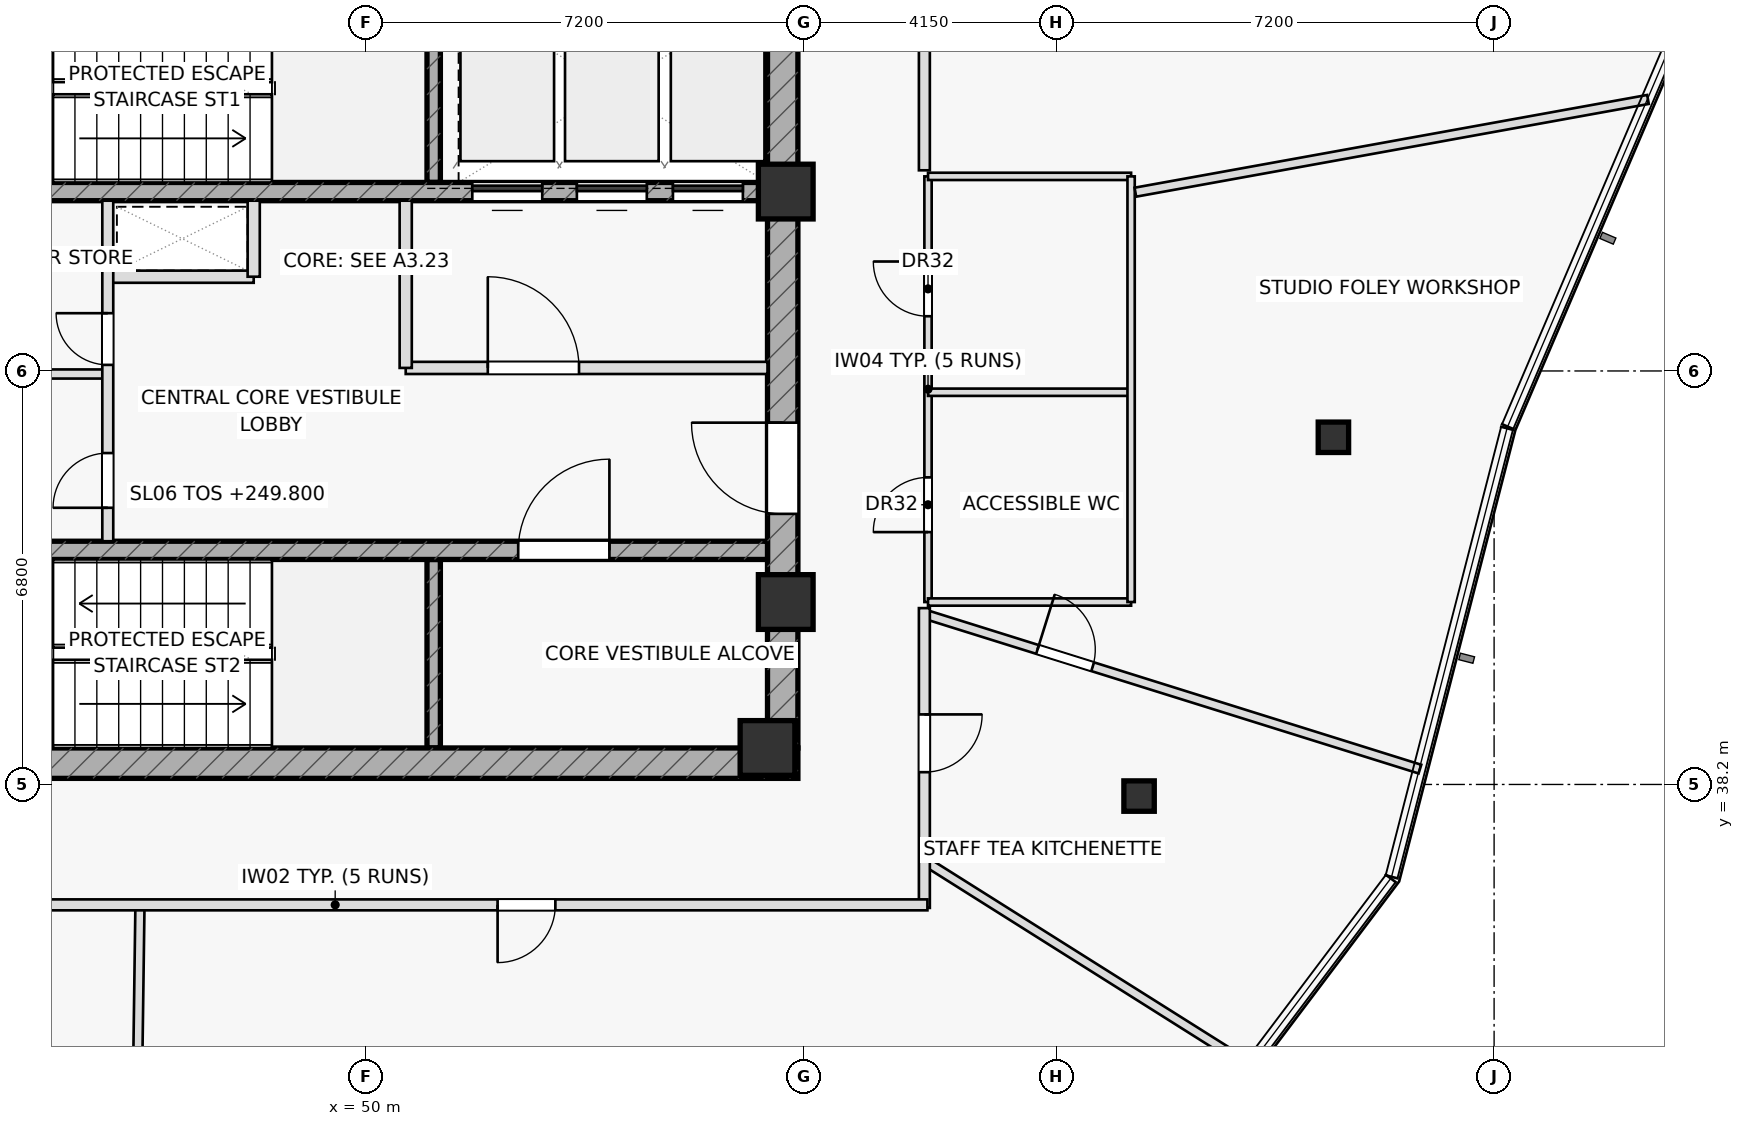
"""IFC4 building model, lengths in metres.
Left out: names, types, materials, properties, quantities, classifications, styles, units other than length and angle.
Written with IfcOpenShell. Run it as: python <this file> out.ifc"""

import sys

from ifc_helpers import new_model, si_unit, direction, frame, frame_2d, origin, origin_2d, place, context, subcontext, project, spatial, rectangle, hollow_rectangle, extrude, element, fill, save


model = new_model("IFC4")
c1 = context("Model", 3, precision=1e-05, world=origin(), true_north=direction((0.0, 1.0)))
c2 = subcontext(c1, "Body", "Model", "MODEL_VIEW")
j1 = project(units=[si_unit("LENGTHUNIT", "METRE"), si_unit("PLANEANGLEUNIT", "RADIAN")], contexts=[c1])
p1 = place(None, origin())
s1 = spatial("IfcSite", under=j1, at=p1, CompositionType="ELEMENT")
p2 = place(p1, origin())
s2 = spatial("IfcBuilding", under=s1, at=p2, CompositionType="ELEMENT")
p3 = place(p2, frame((0.0, 0.0, 249.8)))
s3 = spatial("IfcBuildingStorey", under=s2, at=p3, CompositionType="ELEMENT", Elevation=249.8)
for number, where, z_axis, x_axis in (
    (1, (51.11, 48.1, 0.0), (0.0, 0.0, 1.0), (0.0, 1.0, 0.0)),
    (2, (51.11, 38.8, 0.0), (0.0, 0.0, 1.0), (0.0, 1.0, 0.0)),
):
    element("IfcWall", number, at=place(p3, frame(where, z_axis=z_axis, x_axis=x_axis)), inside=s3, PredefinedType="SHEAR", context=c2, shape_type="SweptSolid", body=[
        extrude(rectangle(XDim=3.1, YDim=0.22, at=frame_2d((1.55, 0.0))), origin(), (0.0, 0.0, 1.0), 3.65),
    ])
p4 = place(p3, frame((42.9, 38.55, 0.0), z_axis=(0.0, 0.0, 1.0), x_axis=(1.0, 0.0, 0.0)))
e3 = element("IfcWall", 3, at=p4, inside=s3, PredefinedType="SHEAR", context=c2, shape_type="SweptSolid", body=[
    extrude(rectangle(XDim=14.2, YDim=0.5, at=frame_2d((7.1, 0.0))), origin(), (0.0, 0.0, 1.0), 3.65),
])
p5 = place(p4, frame((0.78, 0.0, 0.0)))
e4 = element("IfcOpeningElement", 4, at=p5, cuts=e3, PredefinedType="OPENING", context=c2, shape_type="SweptSolid", body=[
    extrude(rectangle(XDim=1.05, YDim=2.2, at=frame_2d((0.525, 1.1))), frame((0.0, 0.26, 0.0), z_axis=(0.0, -1.0, 0.0), x_axis=(1.0, 0.0, 0.0)), (0.0, 0.0, 1.0), 0.52),
])
p6 = place(p3, frame((56.85, 38.8, 0.0), z_axis=(0.0, 0.0, 1.0), x_axis=(0.0, 1.0, 0.0)))
e5 = element("IfcWall", 5, at=p6, inside=s3, PredefinedType="SHEAR", context=c2, shape_type="SweptSolid", body=[
    extrude(rectangle(XDim=12.4, YDim=0.5, at=frame_2d((6.2, 0.0))), origin(), (0.0, 0.0, 1.0), 3.65),
])
p7 = place(p6, frame((3.85, 0.0, 0.0)))
e6 = element("IfcOpeningElement", 6, at=p7, cuts=e5, PredefinedType="OPENING", context=c2, shape_type="SweptSolid", body=[
    extrude(rectangle(XDim=1.5, YDim=2.2, at=frame_2d((0.75, 1.1))), frame((0.0, 0.26, 0.0), z_axis=(0.0, -1.0, 0.0), x_axis=(1.0, 0.0, 0.0)), (0.0, 0.0, 1.0), 0.52),
])
p8 = place(p3, frame((43.4, 47.95, 0.0), z_axis=(0.0, 0.0, 1.0), x_axis=(1.0, 0.0, 0.0)))
e7 = element("IfcWall", 7, at=p8, inside=s3, PredefinedType="SHEAR", context=c2, shape_type="SweptSolid", body=[
    extrude(rectangle(XDim=13.2, YDim=0.3, at=frame_2d((6.6, 0.0))), origin(), (0.0, 0.0, 1.0), 3.65),
])
p9 = place(p8, frame((8.345, 0.0, 0.0)))
e8 = element("IfcOpeningElement", 8, at=p9, cuts=e7, PredefinedType="OPENING", context=c2, shape_type="SweptSolid", body=[
    extrude(rectangle(XDim=1.15, YDim=2.2, at=frame_2d((0.575, 1.1))), frame((0.0, 0.16, 0.0), z_axis=(0.0, -1.0, 0.0), x_axis=(1.0, 0.0, 0.0)), (0.0, 0.0, 1.0), 0.32),
])
p10 = place(p8, frame((10.065, 0.0, 0.0)))
e9 = element("IfcOpeningElement", 9, at=p10, cuts=e7, PredefinedType="OPENING", context=c2, shape_type="SweptSolid", body=[
    extrude(rectangle(XDim=1.15, YDim=2.2, at=frame_2d((0.575, 1.1))), frame((0.0, 0.16, 0.0), z_axis=(0.0, -1.0, 0.0), x_axis=(1.0, 0.0, 0.0)), (0.0, 0.0, 1.0), 0.32),
])
p11 = place(p8, frame((11.645, 0.0, 0.0)))
e10 = element("IfcOpeningElement", 10, at=p11, cuts=e7, PredefinedType="OPENING", context=c2, shape_type="SweptSolid", body=[
    extrude(rectangle(XDim=1.15, YDim=2.2, at=frame_2d((0.575, 1.1))), frame((0.0, 0.16, 0.0), z_axis=(0.0, -1.0, 0.0), x_axis=(1.0, 0.0, 0.0)), (0.0, 0.0, 1.0), 0.32),
])
p12 = place(p3, frame((43.4, 42.05, 0.0), z_axis=(0.0, 0.0, 1.0), x_axis=(1.0, 0.0, 0.0)))
e11 = element("IfcWall", 11, at=p12, inside=s3, PredefinedType="SHEAR", context=c2, shape_type="SweptSolid", body=[
    extrude(rectangle(XDim=13.2, YDim=0.3, at=frame_2d((6.6, 0.0))), origin(), (0.0, 0.0, 1.0), 3.65),
])
p13 = place(p12, frame((9.1, 0.0, 0.0)))
e12 = element("IfcOpeningElement", 12, at=p13, cuts=e11, PredefinedType="OPENING", context=c2, shape_type="SweptSolid", body=[
    extrude(rectangle(XDim=1.5, YDim=2.2, at=frame_2d((0.75, 1.1))), frame((0.0, 0.16, 0.0), z_axis=(0.0, -1.0, 0.0), x_axis=(1.0, 0.0, 0.0)), (0.0, 0.0, 1.0), 0.32),
])
for number, where, z_axis, x_axis in (
    (13, (56.9, 47.95, 0.0), (0.0, 0.0, 1.0), (1.0, 0.0, 0.0)),
    (14, (56.9, 41.2, 0.0), (0.0, 0.0, 1.0), (1.0, 0.0, 0.0)),
    (15, (56.6, 38.8, 0.0), (0.0, 0.0, 1.0), (1.0, 0.0, 0.0)),
):
    element("IfcColumn", number, at=place(p3, frame(where, z_axis=z_axis, x_axis=x_axis)), inside=s3, PredefinedType="COLUMN", context=c2, shape_type="SweptSolid", body=[
        extrude(rectangle(XDim=0.9, YDim=0.9, at=origin_2d()), origin(), (0.0, 0.0, 1.0), 3.65),
    ])
for number, where, z_axis, x_axis in (
    (16, (62.711, 38.009, 0.0), (0.0, 0.0, 1.0), (1.0, 0.0, 0.0)),
    (17, (65.907, 43.909, 0.0), (0.0, 0.0, 1.0), (1.0, 0.0, 0.0)),
):
    element("IfcColumn", number, at=place(p3, frame(where, z_axis=z_axis, x_axis=x_axis)), inside=s3, PredefinedType="COLUMN", context=c2, shape_type="SweptSolid", body=[
        extrude(hollow_rectangle(XDim=0.5, YDim=0.5, WallThickness=0.03, at=origin_2d()), origin(), (0.0, 0.0, 1.0), 3.65),
    ])
p14 = place(p3, frame((45.75, 46.55, 0.0), z_axis=(0.0, 0.0, 1.0), x_axis=(1.0, 0.0, 0.0)))
e18 = element("IfcWall", 18, at=p14, inside=s3, PredefinedType="PARTITIONING", context=c2, shape_type="SweptSolid", body=[
    extrude(rectangle(XDim=2.4, YDim=0.2, at=frame_2d((1.2, 0.0))), origin(), (0.0, 0.0, 1.0), 3.65),
])
p15 = place(p3, frame((48.15, 46.55, 0.0), z_axis=(0.0, 0.0, 1.0), x_axis=(0.0, 1.0, 0.0)))
e19 = element("IfcWall", 19, at=p15, inside=s3, PredefinedType="PARTITIONING", context=c2, shape_type="SweptSolid", body=[
    extrude(rectangle(XDim=1.25, YDim=0.2, at=frame_2d((0.625, 0.0))), origin(), (0.0, 0.0, 1.0), 3.65),
])
p16 = place(p3, frame((50.65, 45.05, 0.0), z_axis=(0.0, 0.0, 1.0), x_axis=(1.0, 0.0, 0.0)))
e20 = element("IfcWall", 20, at=p16, inside=s3, PredefinedType="PARTITIONING", context=c2, shape_type="SweptSolid", body=[
    extrude(rectangle(XDim=5.95, YDim=0.2, at=frame_2d((2.975, 0.0))), origin(), (0.0, 0.0, 1.0), 3.65),
])
p17 = place(p16, frame((1.35, 0.0, 0.0)))
e21 = element("IfcOpeningElement", 21, at=p17, cuts=e20, PredefinedType="OPENING", context=c2, shape_type="SweptSolid", body=[
    extrude(rectangle(XDim=1.5, YDim=2.2, at=frame_2d((0.75, 1.1))), frame((0.0, 0.11, 0.0), z_axis=(0.0, -1.0, 0.0), x_axis=(1.0, 0.0, 0.0)), (0.0, 0.0, 1.0), 0.22),
])
p18 = place(p3, frame((50.65, 45.05, 0.0), z_axis=(0.0, 0.0, 1.0), x_axis=(0.0, 1.0, 0.0)))
e22 = element("IfcWall", 22, at=p18, inside=s3, PredefinedType="PARTITIONING", context=c2, shape_type="SweptSolid", body=[
    extrude(rectangle(XDim=2.75, YDim=0.2, at=frame_2d((1.375, 0.0))), origin(), (0.0, 0.0, 1.0), 3.65),
])
p19 = place(p3, frame((43.4, 44.95, 0.0), z_axis=(0.0, 0.0, 1.0), x_axis=(1.0, 0.0, 0.0)))
e23 = element("IfcWall", 23, at=p19, inside=s3, PredefinedType="PARTITIONING", context=c2, shape_type="SweptSolid", body=[
    extrude(rectangle(XDim=2.35, YDim=0.15, at=frame_2d((1.175, 0.0))), origin(), (0.0, 0.0, 1.0), 3.65),
])
p20 = place(p3, frame((45.75, 42.2, 0.0), z_axis=(0.0, 0.0, 1.0), x_axis=(0.0, 1.0, 0.0)))
e24 = element("IfcWall", 24, at=p20, inside=s3, PredefinedType="PARTITIONING", context=c2, shape_type="SweptSolid", body=[
    extrude(rectangle(XDim=5.6, YDim=0.18, at=frame_2d((2.8, 0.0))), origin(), (0.0, 0.0, 1.0), 3.65),
])
p21 = place(p20, frame((0.55, 0.0, 0.0)))
e25 = element("IfcOpeningElement", 25, at=p21, cuts=e24, PredefinedType="OPENING", context=c2, shape_type="SweptSolid", body=[
    extrude(rectangle(XDim=0.9, YDim=2.05, at=frame_2d((0.45, 1.025))), frame((0.0, 0.1, 0.0), z_axis=(0.0, -1.0, 0.0), x_axis=(1.0, 0.0, 0.0)), (0.0, 0.0, 1.0), 0.2),
])
p22 = place(p20, frame((2.9, 0.0, 0.0)))
e26 = element("IfcOpeningElement", 26, at=p22, cuts=e24, PredefinedType="OPENING", context=c2, shape_type="SweptSolid", body=[
    extrude(rectangle(XDim=0.85, YDim=2.05, at=frame_2d((0.425, 1.025))), frame((0.0, 0.1, 0.0), z_axis=(0.0, -1.0, 0.0), x_axis=(1.0, 0.0, 0.0)), (0.0, 0.0, 1.0), 0.2),
])
p23 = place(p3, frame((59.24, 41.2, 0.0), z_axis=(0.0, 0.0, 1.0), x_axis=(0.0, 1.0, 0.0)))
e27 = element("IfcWall", 27, at=p23, inside=s3, PredefinedType="PARTITIONING", context=c2, shape_type="SweptSolid", body=[
    extrude(rectangle(XDim=7.0, YDim=0.12, at=frame_2d((3.5, 0.0))), origin(), (0.0, 0.0, 1.0), 3.65),
])
p24 = place(p23, frame((1.15, 0.0, 0.0)))
e28 = element("IfcOpeningElement", 28, at=p24, cuts=e27, PredefinedType="OPENING", context=c2, shape_type="SweptSolid", body=[
    extrude(rectangle(XDim=0.9, YDim=2.05, at=frame_2d((0.45, 1.025))), frame((0.0, 0.07, 0.0), z_axis=(0.0, -1.0, 0.0), x_axis=(1.0, 0.0, 0.0)), (0.0, 0.0, 1.0), 0.14),
])
p25 = place(p23, frame((4.7, 0.0, 0.0)))
e29 = element("IfcOpeningElement", 29, at=p25, cuts=e27, PredefinedType="OPENING", context=c2, shape_type="SweptSolid", body=[
    extrude(rectangle(XDim=0.9, YDim=2.05, at=frame_2d((0.45, 1.025))), frame((0.0, 0.07, 0.0), z_axis=(0.0, -1.0, 0.0), x_axis=(1.0, 0.0, 0.0)), (0.0, 0.0, 1.0), 0.14),
])
p26 = place(p3, frame((59.24, 41.2, 0.0), z_axis=(0.0, 0.0, 1.0), x_axis=(1.0, 0.0, 0.0)))
e30 = element("IfcWall", 30, at=p26, inside=s3, PredefinedType="PARTITIONING", context=c2, shape_type="SweptSolid", body=[
    extrude(rectangle(XDim=3.34, YDim=0.12, at=frame_2d((1.67, 0.0))), origin(), (0.0, 0.0, 1.0), 3.075),
])
for number, where, z_axis, x_axis in (
    (31, (59.24, 44.65, 0.0), (0.0, 0.0, 1.0), (1.0, 0.0, 0.0)),
    (32, (59.24, 48.2, 0.0), (0.0, 0.0, 1.0), (1.0, 0.0, 0.0)),
):
    element("IfcWall", number, at=place(p3, frame(where, z_axis=z_axis, x_axis=x_axis)), inside=s3, PredefinedType="PARTITIONING", context=c2, shape_type="SweptSolid", body=[
        extrude(rectangle(XDim=3.34, YDim=0.12, at=frame_2d((1.67, 0.0))), origin(), (0.0, 0.0, 1.0), 3.65),
    ])
p27 = place(p3, frame((62.58, 41.2, 0.0), z_axis=(0.0, 0.0, 1.0), x_axis=(0.0, 1.0, 0.0)))
e33 = element("IfcWall", 33, at=p27, inside=s3, PredefinedType="PARTITIONING", context=c2, shape_type="SweptSolid", body=[
    extrude(rectangle(XDim=7.0, YDim=0.12, at=frame_2d((3.5, 0.0))), origin(), (0.0, 0.0, 1.0), 3.355),
])
p28 = place(p3, frame((46.279, 36.22, 0.0), z_axis=(0.0, 0.0, 1.0), x_axis=(-0.013742019397, -0.999905573993, 0.0)))
e34 = element("IfcWall", 34, at=p28, inside=s3, PredefinedType="PARTITIONING", context=c2, shape_type="SweptSolid", body=[
    extrude(rectangle(XDim=16.167, YDim=0.15, at=frame_2d((8.083, 0.0))), origin(), (0.0, 0.0, 1.0), 3.075),
])
p29 = place(p3, frame((59.18, 36.946, 0.0), z_axis=(0.0, 0.0, 1.0), x_axis=(0.846029953898, -0.533135364713, 0.0)))
e35 = element("IfcWall", 35, at=p29, inside=s3, PredefinedType="PARTITIONING", context=c2, shape_type="SweptSolid", body=[
    extrude(rectangle(XDim=6.332, YDim=0.15, at=frame_2d((3.166, 0.0))), origin(), (0.0, 0.0, 1.0), 3.175),
])
p30 = place(p3, frame((59.18, 41.002, 0.0), z_axis=(0.0, 0.0, 1.0), x_axis=(0.954391930712, -0.298556598641, 0.0)))
e36 = element("IfcWall", 36, at=p30, inside=s3, PredefinedType="PARTITIONING", context=c2, shape_type="SweptSolid", body=[
    extrude(rectangle(XDim=8.54, YDim=0.15, at=frame_2d((4.27, 0.0))), origin(), (0.0, 0.0, 1.0), 3.075),
])
p31 = place(p30, frame((1.95, 0.0, 0.0)))
e37 = element("IfcOpeningElement", 37, at=p31, cuts=e36, PredefinedType="OPENING", context=c2, shape_type="SweptSolid", body=[
    extrude(rectangle(XDim=0.95, YDim=2.05, at=frame_2d((0.475, 1.025))), frame((0.0, 0.085, 0.0), z_axis=(0.0, -1.0, 0.0), x_axis=(1.0, 0.0, 0.0)), (0.0, 0.0, 1.0), 0.17),
])
p32 = place(p3, frame((62.65, 47.94, 0.0), z_axis=(0.0, 0.0, 1.0), x_axis=(0.984027735719, 0.178015210965, 0.0)))
e38 = element("IfcWall", 38, at=p32, inside=s3, PredefinedType="PARTITIONING", context=c2, shape_type="SweptSolid", body=[
    extrude(rectangle(XDim=8.568, YDim=0.15, at=frame_2d((4.284, 0.0))), origin(), (0.0, 0.0, 1.0), 3.175),
])
p33 = place(p3, frame((59.18, 53.83, 0.0), z_axis=(0.0, 0.0, 1.0), x_axis=(0.0, -1.0, 0.0)))
e39 = element("IfcWall", 39, at=p33, inside=s3, PredefinedType="PARTITIONING", context=c2, shape_type="SweptSolid", body=[
    extrude(rectangle(XDim=5.53, YDim=0.18, at=frame_2d((2.765, 0.0))), origin(), (0.0, 0.0, 1.0), 3.65),
])
p34 = place(p33, frame((2.29, 0.0, 0.0)))
e40 = element("IfcOpeningElement", 40, at=p34, cuts=e39, PredefinedType="OPENING", context=c2, shape_type="SweptSolid", body=[
    extrude(rectangle(XDim=0.95, YDim=2.05, at=frame_2d((0.475, 1.025))), frame((0.0, 0.1, 0.0), z_axis=(0.0, -1.0, 0.0), x_axis=(1.0, 0.0, 0.0)), (0.0, 0.0, 1.0), 0.2),
])
p35 = place(p3, frame((59.18, 41.1, 0.0), z_axis=(0.0, 0.0, 1.0), x_axis=(0.0, -1.0, 0.0)))
e41 = element("IfcWall", 41, at=p35, inside=s3, PredefinedType="PARTITIONING", context=c2, shape_type="SweptSolid", body=[
    extrude(rectangle(XDim=4.93, YDim=0.18, at=frame_2d((2.465, 0.0))), origin(), (0.0, 0.0, 1.0), 3.355),
])
p36 = place(p35, frame((1.748, 0.0, 0.0)))
e42 = element("IfcOpeningElement", 42, at=p36, cuts=e41, PredefinedType="OPENING", context=c2, shape_type="SweptSolid", body=[
    extrude(rectangle(XDim=0.95, YDim=2.05, at=frame_2d((0.475, 1.025))), frame((0.0, 0.1, 0.0), z_axis=(0.0, -1.0, 0.0), x_axis=(1.0, 0.0, 0.0)), (0.0, 0.0, 1.0), 0.2),
])
p37 = place(p3, frame((59.23, 36.22, 0.0), z_axis=(0.0, 0.0, 1.0), x_axis=(-1.0, 0.0, 0.0)))
e43 = element("IfcWall", 43, at=p37, inside=s3, PredefinedType="PARTITIONING", context=c2, shape_type="SweptSolid", body=[
    extrude(rectangle(XDim=19.48, YDim=0.18, at=frame_2d((9.74, 0.0))), origin(), (0.0, 0.0, 1.0), 3.075),
])
p38 = place(p37, frame((6.119, 0.0, 0.0)))
e44 = element("IfcOpeningElement", 44, at=p38, cuts=e43, PredefinedType="OPENING", context=c2, shape_type="SweptSolid", body=[
    extrude(rectangle(XDim=0.95, YDim=2.05, at=frame_2d((0.475, 1.025))), frame((0.0, 0.1, 0.0), z_axis=(0.0, -1.0, 0.0), x_axis=(1.0, 0.0, 0.0)), (0.0, 0.0, 1.0), 0.2),
])
p39 = place(p37, frame((14.639, 0.0, 0.0)))
e45 = element("IfcOpeningElement", 45, at=p39, cuts=e43, PredefinedType="OPENING", context=c2, shape_type="SweptSolid", body=[
    extrude(rectangle(XDim=0.95, YDim=2.05, at=frame_2d((0.475, 1.025))), frame((0.0, 0.1, 0.0), z_axis=(0.0, -1.0, 0.0), x_axis=(1.0, 0.0, 0.0)), (0.0, 0.0, 1.0), 0.2),
])
p40 = place(p37, frame((17.795, 0.0, 0.0)))
e46 = element("IfcOpeningElement", 46, at=p40, cuts=e43, PredefinedType="OPENING", context=c2, shape_type="SweptSolid", body=[
    extrude(rectangle(XDim=0.95, YDim=2.05, at=frame_2d((0.475, 1.025))), frame((0.0, 0.1, 0.0), z_axis=(0.0, -1.0, 0.0), x_axis=(1.0, 0.0, 0.0)), (0.0, 0.0, 1.0), 0.2),
])
p41 = place(p7, origin())
e47 = element("IfcDoor", 47, at=p41, inside=s3, OperationType="SINGLE_SWING_RIGHT", PredefinedType="DOOR", context=c2, shape_type="SweptSolid", body=[
    extrude(rectangle(XDim=1.5, YDim=2.2, at=frame_2d((0.75, 1.1))), frame((0.0, 0.025, 0.0), z_axis=(0.0, -1.0, 0.0), x_axis=(1.0, 0.0, 0.0)), (0.0, 0.0, 1.0), 0.05),
])
fill(e6, e47)
p42 = place(p17, origin())
e48 = element("IfcDoor", 48, at=p42, inside=s3, OperationType="SINGLE_SWING_LEFT", PredefinedType="DOOR", context=c2, shape_type="SweptSolid", body=[
    extrude(rectangle(XDim=1.5, YDim=2.2, at=frame_2d((0.75, 1.1))), frame((0.0, 0.025, 0.0), z_axis=(0.0, -1.0, 0.0), x_axis=(1.0, 0.0, 0.0)), (0.0, 0.0, 1.0), 0.05),
])
fill(e21, e48)
p43 = place(p13, origin())
e49 = element("IfcDoor", 49, at=p43, inside=s3, OperationType="SINGLE_SWING_RIGHT", PredefinedType="DOOR", context=c2, shape_type="SweptSolid", body=[
    extrude(rectangle(XDim=1.5, YDim=2.2, at=frame_2d((0.75, 1.1))), frame((0.0, 0.025, 0.0), z_axis=(0.0, -1.0, 0.0), x_axis=(1.0, 0.0, 0.0)), (0.0, 0.0, 1.0), 0.05),
])
fill(e12, e49)
p44 = place(p21, origin())
e50 = element("IfcDoor", 50, at=p44, inside=s3, OperationType="SINGLE_SWING_LEFT", PredefinedType="DOOR", context=c2, shape_type="SweptSolid", body=[
    extrude(rectangle(XDim=0.9, YDim=2.05, at=frame_2d((0.45, 1.025))), frame((0.0, 0.025, 0.0), z_axis=(0.0, -1.0, 0.0), x_axis=(1.0, 0.0, 0.0)), (0.0, 0.0, 1.0), 0.05),
])
fill(e25, e50)
p45 = place(p22, origin())
e51 = element("IfcDoor", 51, at=p45, inside=s3, OperationType="SINGLE_SWING_RIGHT", PredefinedType="DOOR", context=c2, shape_type="SweptSolid", body=[
    extrude(rectangle(XDim=0.85, YDim=2.05, at=frame_2d((0.425, 1.025))), frame((0.0, 0.025, 0.0), z_axis=(0.0, -1.0, 0.0), x_axis=(1.0, 0.0, 0.0)), (0.0, 0.0, 1.0), 0.05),
])
fill(e26, e51)
p46 = place(p24, origin())
e52 = element("IfcDoor", 52, at=p46, inside=s3, OperationType="SINGLE_SWING_LEFT", PredefinedType="DOOR", context=c2, shape_type="SweptSolid", body=[
    extrude(rectangle(XDim=0.9, YDim=2.05, at=frame_2d((0.45, 1.025))), frame((0.0, 0.025, 0.0), z_axis=(0.0, -1.0, 0.0), x_axis=(1.0, 0.0, 0.0)), (0.0, 0.0, 1.0), 0.05),
])
fill(e28, e52)
p47 = place(p25, origin())
e53 = element("IfcDoor", 53, at=p47, inside=s3, OperationType="SINGLE_SWING_RIGHT", PredefinedType="DOOR", context=c2, shape_type="SweptSolid", body=[
    extrude(rectangle(XDim=0.9, YDim=2.05, at=frame_2d((0.45, 1.025))), frame((0.0, 0.025, 0.0), z_axis=(0.0, -1.0, 0.0), x_axis=(1.0, 0.0, 0.0)), (0.0, 0.0, 1.0), 0.05),
])
fill(e29, e53)
p48 = place(p31, origin())
e54 = element("IfcDoor", 54, at=p48, inside=s3, OperationType="SINGLE_SWING_LEFT", PredefinedType="DOOR", context=c2, shape_type="SweptSolid", body=[
    extrude(rectangle(XDim=0.95, YDim=2.05, at=frame_2d((0.475, 1.025))), frame((0.0, 0.025, 0.0), z_axis=(0.0, -1.0, 0.0), x_axis=(1.0, 0.0, 0.0)), (0.0, 0.0, 1.0), 0.05),
])
fill(e37, e54)
p49 = place(p36, origin())
e55 = element("IfcDoor", 55, at=p49, inside=s3, OperationType="SINGLE_SWING_LEFT", PredefinedType="DOOR", context=c2, shape_type="SweptSolid", body=[
    extrude(rectangle(XDim=0.95, YDim=2.05, at=frame_2d((0.475, 1.025))), frame((0.0, 0.025, 0.0), z_axis=(0.0, -1.0, 0.0), x_axis=(1.0, 0.0, 0.0)), (0.0, 0.0, 1.0), 0.05),
])
fill(e42, e55)
p50 = place(p38, origin())
e56 = element("IfcDoor", 56, at=p50, inside=s3, OperationType="SINGLE_SWING_RIGHT", PredefinedType="DOOR", context=c2, shape_type="SweptSolid", body=[
    extrude(rectangle(XDim=0.95, YDim=2.05, at=frame_2d((0.475, 1.025))), frame((0.0, 0.025, 0.0), z_axis=(0.0, -1.0, 0.0), x_axis=(1.0, 0.0, 0.0)), (0.0, 0.0, 1.0), 0.05),
])
fill(e44, e56)
p51 = place(p9, origin())
e57 = element("IfcDoor", 57, at=p51, inside=s3, OperationType="SLIDING_TO_LEFT", PredefinedType="DOOR", context=c2, shape_type="SweptSolid", body=[
    extrude(rectangle(XDim=1.15, YDim=2.2, at=frame_2d((0.575, 1.1))), frame((0.0, 0.025, 0.0), z_axis=(0.0, -1.0, 0.0), x_axis=(1.0, 0.0, 0.0)), (0.0, 0.0, 1.0), 0.05),
])
fill(e8, e57)
p52 = place(p10, origin())
e58 = element("IfcDoor", 58, at=p52, inside=s3, OperationType="SLIDING_TO_LEFT", PredefinedType="DOOR", context=c2, shape_type="SweptSolid", body=[
    extrude(rectangle(XDim=1.15, YDim=2.2, at=frame_2d((0.575, 1.1))), frame((0.0, 0.025, 0.0), z_axis=(0.0, -1.0, 0.0), x_axis=(1.0, 0.0, 0.0)), (0.0, 0.0, 1.0), 0.05),
])
fill(e9, e58)
p53 = place(p11, origin())
e59 = element("IfcDoor", 59, at=p53, inside=s3, OperationType="SLIDING_TO_LEFT", PredefinedType="DOOR", context=c2, shape_type="SweptSolid", body=[
    extrude(rectangle(XDim=1.15, YDim=2.2, at=frame_2d((0.575, 1.1))), frame((0.0, 0.025, 0.0), z_axis=(0.0, -1.0, 0.0), x_axis=(1.0, 0.0, 0.0)), (0.0, 0.0, 1.0), 0.05),
])
fill(e10, e59)
save(model, sys.argv[1])
